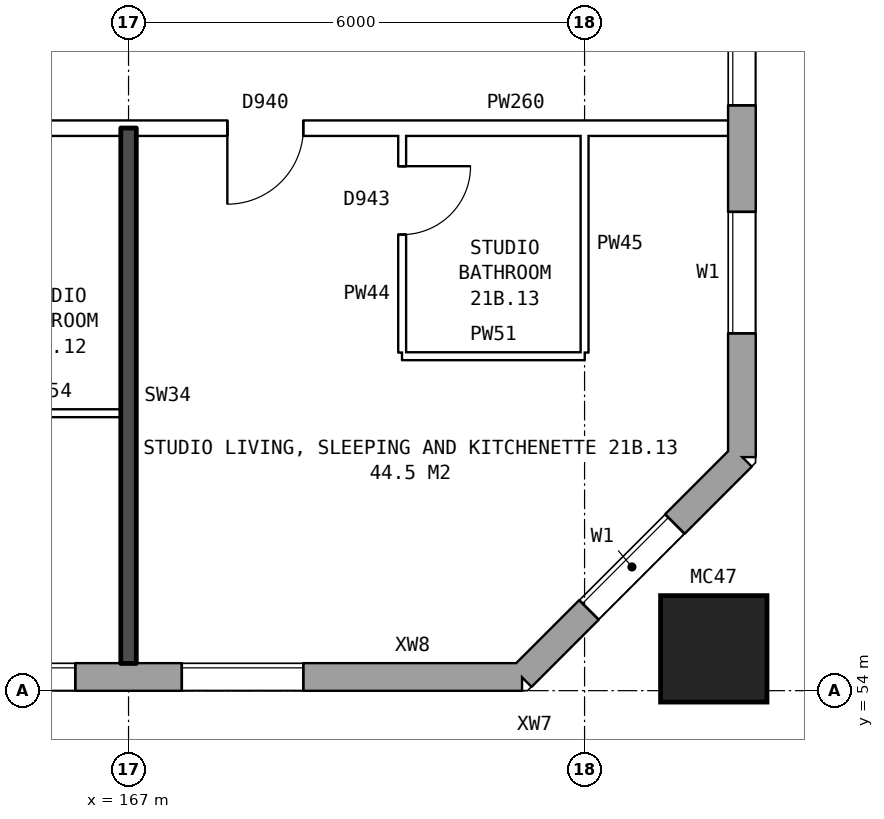
"""IFC4 building model, lengths in metres.
Left out: names, types, materials, properties, quantities, classifications, styles, units other than length and angle.
Written with IfcOpenShell. Run it as: python <this file> out.ifc"""

import sys

from ifc_helpers import new_model, si_unit, direction, frame, frame_2d, origin, origin_2d, place, context, subcontext, project, spatial, rectangle, hollow_rectangle, extrude, element, fill, save


model = new_model("IFC4")
c1 = context("Model", 3, precision=1e-05, world=origin(), true_north=direction((0.0, 1.0)))
c2 = subcontext(c1, "Body", "Model", "MODEL_VIEW")
j1 = project(units=[si_unit("LENGTHUNIT", "METRE"), si_unit("PLANEANGLEUNIT", "RADIAN")], contexts=[c1])
p1 = place(None, origin())
s1 = spatial("IfcSite", under=j1, at=p1, CompositionType="ELEMENT")
p2 = place(p1, origin())
s2 = spatial("IfcBuilding", under=s1, at=p2, CompositionType="ELEMENT")
p3 = place(p2, frame((0.0, 0.0, 77.8)))
s3 = spatial("IfcBuildingStorey", under=s2, at=p3, CompositionType="ELEMENT", Elevation=77.8)
p4 = place(p3, frame((174.7, 54.55, 0.0), z_axis=(0.0, 0.0, 1.0), x_axis=(1.0, 0.0, 0.0)))
e1 = element("IfcColumn", 1, at=p4, inside=s3, PredefinedType="COLUMN", context=c2, shape_type="SweptSolid", body=[
    extrude(hollow_rectangle(XDim=1.4, YDim=1.4, WallThickness=0.075, at=origin_2d()), origin(), (0.0, 0.0, 1.0), 3.1),
])
p5 = place(p3, frame((134.075, 54.18, 0.0), z_axis=(0.0, 0.0, 1.0), x_axis=(1.0, 0.0, 0.0)))
e2 = element("IfcWall", 2, at=p5, inside=s3, PredefinedType="STANDARD", context=c2, shape_type="SweptSolid", body=[
    extrude(rectangle(XDim=38.101, YDim=0.36, at=frame_2d((19.05, 0.0))), origin(), (0.0, 0.0, 1.0), 2.85),
])
p6 = place(p5, frame((0.625, 0.0, 0.8)))
e3 = element("IfcOpeningElement", 3, at=p6, cuts=e2, PredefinedType="OPENING", context=c2, shape_type="SweptSolid", body=[
    extrude(rectangle(XDim=1.6, YDim=1.8, at=frame_2d((0.8, 0.9))), frame((0.0, 0.19, 0.0), z_axis=(0.0, -1.0, 0.0), x_axis=(1.0, 0.0, 0.0)), (0.0, 0.0, 1.0), 0.38),
])
p7 = place(p5, frame((3.625, 0.0, 0.8)))
e4 = element("IfcOpeningElement", 4, at=p7, cuts=e2, PredefinedType="OPENING", context=c2, shape_type="SweptSolid", body=[
    extrude(rectangle(XDim=1.6, YDim=1.8, at=frame_2d((0.8, 0.9))), frame((0.0, 0.19, 0.0), z_axis=(0.0, -1.0, 0.0), x_axis=(1.0, 0.0, 0.0)), (0.0, 0.0, 1.0), 0.38),
])
p8 = place(p5, frame((5.525, 0.0, 0.8)))
e5 = element("IfcOpeningElement", 5, at=p8, cuts=e2, PredefinedType="OPENING", context=c2, shape_type="SweptSolid", body=[
    extrude(rectangle(XDim=1.6, YDim=1.8, at=frame_2d((0.8, 0.9))), frame((0.0, 0.19, 0.0), z_axis=(0.0, -1.0, 0.0), x_axis=(1.0, 0.0, 0.0)), (0.0, 0.0, 1.0), 0.38),
])
p9 = place(p5, frame((9.425, 0.0, 0.65)))
e6 = element("IfcOpeningElement", 6, at=p9, cuts=e2, PredefinedType="OPENING", context=c2, shape_type="SweptSolid", body=[
    extrude(rectangle(XDim=0.6, YDim=0.9, at=frame_2d((0.3, 0.45))), frame((0.0, 0.19, 0.0), z_axis=(0.0, -1.0, 0.0), x_axis=(1.0, 0.0, 0.0)), (0.0, 0.0, 1.0), 0.38),
])
p10 = place(p5, frame((12.625, 0.0, 0.8)))
e7 = element("IfcOpeningElement", 7, at=p10, cuts=e2, PredefinedType="OPENING", context=c2, shape_type="SweptSolid", body=[
    extrude(rectangle(XDim=1.6, YDim=1.8, at=frame_2d((0.8, 0.9))), frame((0.0, 0.19, 0.0), z_axis=(0.0, -1.0, 0.0), x_axis=(1.0, 0.0, 0.0)), (0.0, 0.0, 1.0), 0.38),
])
p11 = place(p5, frame((15.625, 0.0, 0.8)))
e8 = element("IfcOpeningElement", 8, at=p11, cuts=e2, PredefinedType="OPENING", context=c2, shape_type="SweptSolid", body=[
    extrude(rectangle(XDim=1.6, YDim=1.8, at=frame_2d((0.8, 0.9))), frame((0.0, 0.19, 0.0), z_axis=(0.0, -1.0, 0.0), x_axis=(1.0, 0.0, 0.0)), (0.0, 0.0, 1.0), 0.38),
])
p12 = place(p5, frame((18.625, 0.0, 0.8)))
e9 = element("IfcOpeningElement", 9, at=p12, cuts=e2, PredefinedType="OPENING", context=c2, shape_type="SweptSolid", body=[
    extrude(rectangle(XDim=1.6, YDim=1.8, at=frame_2d((0.8, 0.9))), frame((0.0, 0.19, 0.0), z_axis=(0.0, -1.0, 0.0), x_axis=(1.0, 0.0, 0.0)), (0.0, 0.0, 1.0), 0.38),
])
p13 = place(p5, frame((21.625, 0.0, 0.8)))
e10 = element("IfcOpeningElement", 10, at=p13, cuts=e2, PredefinedType="OPENING", context=c2, shape_type="SweptSolid", body=[
    extrude(rectangle(XDim=1.6, YDim=1.8, at=frame_2d((0.8, 0.9))), frame((0.0, 0.19, 0.0), z_axis=(0.0, -1.0, 0.0), x_axis=(1.0, 0.0, 0.0)), (0.0, 0.0, 1.0), 0.38),
])
p14 = place(p5, frame((24.625, 0.0, 0.8)))
e11 = element("IfcOpeningElement", 11, at=p14, cuts=e2, PredefinedType="OPENING", context=c2, shape_type="SweptSolid", body=[
    extrude(rectangle(XDim=1.6, YDim=1.8, at=frame_2d((0.8, 0.9))), frame((0.0, 0.19, 0.0), z_axis=(0.0, -1.0, 0.0), x_axis=(1.0, 0.0, 0.0)), (0.0, 0.0, 1.0), 0.38),
])
p15 = place(p5, frame((27.125, 0.0, 0.8)))
e12 = element("IfcOpeningElement", 12, at=p15, cuts=e2, PredefinedType="OPENING", context=c2, shape_type="SweptSolid", body=[
    extrude(rectangle(XDim=1.4, YDim=0.9, at=frame_2d((0.7, 0.45))), frame((0.0, 0.19, 0.0), z_axis=(0.0, -1.0, 0.0), x_axis=(1.0, 0.0, 0.0)), (0.0, 0.0, 1.0), 0.38),
])
p16 = place(p5, frame((30.625, 0.0, 0.8)))
e13 = element("IfcOpeningElement", 13, at=p16, cuts=e2, PredefinedType="OPENING", context=c2, shape_type="SweptSolid", body=[
    extrude(rectangle(XDim=1.6, YDim=1.8, at=frame_2d((0.8, 0.9))), frame((0.0, 0.19, 0.0), z_axis=(0.0, -1.0, 0.0), x_axis=(1.0, 0.0, 0.0)), (0.0, 0.0, 1.0), 0.38),
])
p17 = place(p5, frame((33.625, 0.0, 0.8)))
e14 = element("IfcOpeningElement", 14, at=p17, cuts=e2, PredefinedType="OPENING", context=c2, shape_type="SweptSolid", body=[
    extrude(rectangle(XDim=1.6, YDim=1.8, at=frame_2d((0.8, 0.9))), frame((0.0, 0.19, 0.0), z_axis=(0.0, -1.0, 0.0), x_axis=(1.0, 0.0, 0.0)), (0.0, 0.0, 1.0), 0.38),
])
p18 = place(p5, frame((7.425, 0.0, 1.3)))
e15 = element("IfcOpeningElement", 15, at=p18, cuts=e2, PredefinedType="OPENING", context=c2, shape_type="SweptSolid", body=[
    extrude(rectangle(XDim=0.6, YDim=1.2, at=frame_2d((0.3, 0.6))), frame((0.0, 0.19, 0.0), z_axis=(0.0, -1.0, 0.0), x_axis=(1.0, 0.0, 0.0)), (0.0, 0.0, 1.0), 0.38),
])
p19 = place(p5, frame((10.325, 0.0, 0.65)))
e16 = element("IfcOpeningElement", 16, at=p19, cuts=e2, PredefinedType="OPENING", context=c2, shape_type="SweptSolid", body=[
    extrude(rectangle(XDim=1.4, YDim=1.8, at=frame_2d((0.7, 0.9))), frame((0.0, 0.19, 0.0), z_axis=(0.0, -1.0, 0.0), x_axis=(1.0, 0.0, 0.0)), (0.0, 0.0, 1.0), 0.38),
])
p20 = place(p5, frame((29.675, 0.0, 1.7)))
e17 = element("IfcOpeningElement", 17, at=p20, cuts=e2, PredefinedType="OPENING", context=c2, shape_type="SweptSolid", body=[
    extrude(rectangle(XDim=0.6, YDim=0.9, at=frame_2d((0.3, 0.45))), frame((0.0, 0.19, 0.0), z_axis=(0.0, -1.0, 0.0), x_axis=(1.0, 0.0, 0.0)), (0.0, 0.0, 1.0), 0.38),
])
p21 = place(p3, frame((172.175, 54.18, 0.0), z_axis=(0.0, 0.0, 1.0), x_axis=(0.707106781187, 0.707106781187, 0.0)))
e18 = element("IfcWall", 18, at=p21, inside=s3, PredefinedType="STANDARD", context=c2, shape_type="SweptSolid", body=[
    extrude(rectangle(XDim=4.094, YDim=0.36, at=frame_2d((2.047, 0.0))), origin(), (0.0, 0.0, 1.0), 2.85),
])
p22 = place(p21, frame((1.247, 0.0, 0.8)))
e19 = element("IfcOpeningElement", 19, at=p22, cuts=e18, PredefinedType="OPENING", context=c2, shape_type="SweptSolid", body=[
    extrude(rectangle(XDim=1.6, YDim=1.8, at=frame_2d((0.8, 0.9))), frame((0.0, 0.19, 0.0), z_axis=(0.0, -1.0, 0.0), x_axis=(1.0, 0.0, 0.0)), (0.0, 0.0, 1.0), 0.38),
])
p23 = place(p3, frame((175.07, 57.075, 0.0), z_axis=(0.0, 0.0, 1.0), x_axis=(0.0, 1.0, 0.0)))
e20 = element("IfcWall", 20, at=p23, inside=s3, PredefinedType="STANDARD", context=c2, shape_type="SweptSolid", body=[
    extrude(rectangle(XDim=25.851, YDim=0.36, at=frame_2d((12.925, 0.0))), origin(), (0.0, 0.0, 1.0), 2.85),
])
p24 = place(p23, frame((1.625, 0.0, 0.8)))
e21 = element("IfcOpeningElement", 21, at=p24, cuts=e20, PredefinedType="OPENING", context=c2, shape_type="SweptSolid", body=[
    extrude(rectangle(XDim=1.6, YDim=1.8, at=frame_2d((0.8, 0.9))), frame((0.0, 0.19, 0.0), z_axis=(0.0, -1.0, 0.0), x_axis=(1.0, 0.0, 0.0)), (0.0, 0.0, 1.0), 0.38),
])
p25 = place(p23, frame((4.625, 0.0, 0.8)))
e22 = element("IfcOpeningElement", 22, at=p25, cuts=e20, PredefinedType="OPENING", context=c2, shape_type="SweptSolid", body=[
    extrude(rectangle(XDim=1.6, YDim=1.8, at=frame_2d((0.8, 0.9))), frame((0.0, 0.19, 0.0), z_axis=(0.0, -1.0, 0.0), x_axis=(1.0, 0.0, 0.0)), (0.0, 0.0, 1.0), 0.38),
])
p26 = place(p23, frame((7.625, 0.0, 0.8)))
e23 = element("IfcOpeningElement", 23, at=p26, cuts=e20, PredefinedType="OPENING", context=c2, shape_type="SweptSolid", body=[
    extrude(rectangle(XDim=1.6, YDim=1.8, at=frame_2d((0.8, 0.9))), frame((0.0, 0.19, 0.0), z_axis=(0.0, -1.0, 0.0), x_axis=(1.0, 0.0, 0.0)), (0.0, 0.0, 1.0), 0.38),
])
p27 = place(p23, frame((6.525, 0.0, 0.8)))
e24 = element("IfcOpeningElement", 24, at=p27, cuts=e20, PredefinedType="OPENING", context=c2, shape_type="SweptSolid", body=[
    extrude(rectangle(XDim=0.8, YDim=1.8, at=frame_2d((0.4, 0.9))), frame((0.0, 0.19, 0.0), z_axis=(0.0, -1.0, 0.0), x_axis=(1.0, 0.0, 0.0)), (0.0, 0.0, 1.0), 0.38),
])
p28 = place(p23, frame((9.525, 0.0, 0.8)))
e25 = element("IfcOpeningElement", 25, at=p28, cuts=e20, PredefinedType="OPENING", context=c2, shape_type="SweptSolid", body=[
    extrude(rectangle(XDim=1.4, YDim=1.2, at=frame_2d((0.7, 0.6))), frame((0.0, 0.19, 0.0), z_axis=(0.0, -1.0, 0.0), x_axis=(1.0, 0.0, 0.0)), (0.0, 0.0, 1.0), 0.38),
])
p29 = place(p23, frame((16.625, 0.0, 0.8)))
e26 = element("IfcOpeningElement", 26, at=p29, cuts=e20, PredefinedType="OPENING", context=c2, shape_type="SweptSolid", body=[
    extrude(rectangle(XDim=1.6, YDim=1.8, at=frame_2d((0.8, 0.9))), frame((0.0, 0.19, 0.0), z_axis=(0.0, -1.0, 0.0), x_axis=(1.0, 0.0, 0.0)), (0.0, 0.0, 1.0), 0.38),
])
p30 = place(p23, frame((19.625, 0.0, 0.8)))
e27 = element("IfcOpeningElement", 27, at=p30, cuts=e20, PredefinedType="OPENING", context=c2, shape_type="SweptSolid", body=[
    extrude(rectangle(XDim=1.6, YDim=1.8, at=frame_2d((0.8, 0.9))), frame((0.0, 0.19, 0.0), z_axis=(0.0, -1.0, 0.0), x_axis=(1.0, 0.0, 0.0)), (0.0, 0.0, 1.0), 0.38),
])
p31 = place(p23, frame((22.625, 0.0, 0.8)))
e28 = element("IfcOpeningElement", 28, at=p31, cuts=e20, PredefinedType="OPENING", context=c2, shape_type="SweptSolid", body=[
    extrude(rectangle(XDim=1.6, YDim=1.8, at=frame_2d((0.8, 0.9))), frame((0.0, 0.19, 0.0), z_axis=(0.0, -1.0, 0.0), x_axis=(1.0, 0.0, 0.0)), (0.0, 0.0, 1.0), 0.38),
])
p32 = place(p23, frame((12.275, 0.0, 0.8)))
e29 = element("IfcOpeningElement", 29, at=p32, cuts=e20, PredefinedType="OPENING", context=c2, shape_type="SweptSolid", body=[
    extrude(rectangle(XDim=1.2, YDim=1.8, at=frame_2d((0.6, 0.9))), frame((0.0, 0.19, 0.0), z_axis=(0.0, -1.0, 0.0), x_axis=(1.0, 0.0, 0.0)), (0.0, 0.0, 1.0), 0.38),
])
p33 = place(p23, frame((14.475, 0.0, 0.8)))
e30 = element("IfcOpeningElement", 30, at=p33, cuts=e20, PredefinedType="OPENING", context=c2, shape_type="SweptSolid", body=[
    extrude(rectangle(XDim=1.2, YDim=0.9, at=frame_2d((0.6, 0.45))), frame((0.0, 0.19, 0.0), z_axis=(0.0, -1.0, 0.0), x_axis=(1.0, 0.0, 0.0)), (0.0, 0.0, 1.0), 0.38),
])
p34 = place(p23, frame((18.525, 0.0, 0.8)))
e31 = element("IfcOpeningElement", 31, at=p34, cuts=e20, PredefinedType="OPENING", context=c2, shape_type="SweptSolid", body=[
    extrude(rectangle(XDim=0.6, YDim=1.8, at=frame_2d((0.3, 0.9))), frame((0.0, 0.19, 0.0), z_axis=(0.0, -1.0, 0.0), x_axis=(1.0, 0.0, 0.0)), (0.0, 0.0, 1.0), 0.38),
])
p35 = place(p3, frame((165.0, 57.65, 0.0), z_axis=(0.0, 0.0, 1.0), x_axis=(1.0, 0.0, 0.0)))
e32 = element("IfcWall", 32, at=p35, inside=s3, PredefinedType="PARTITIONING", context=c2, shape_type="SweptSolid", body=[
    extrude(rectangle(XDim=1.9, YDim=0.1, at=frame_2d((0.95, 0.0))), origin(), (0.0, 0.0, 1.0), 2.85),
])
p36 = place(p3, frame((170.6, 58.4, 0.0), z_axis=(0.0, 0.0, 1.0), x_axis=(1.0, 0.0, 0.0)))
e33 = element("IfcWall", 33, at=p36, inside=s3, PredefinedType="PARTITIONING", context=c2, shape_type="SweptSolid", body=[
    extrude(rectangle(XDim=2.4, YDim=0.1, at=frame_2d((1.2, 0.0))), origin(), (0.0, 0.0, 1.0), 2.85),
])
p37 = place(p3, frame((155.1, 61.4, 0.0), z_axis=(0.0, 0.0, 1.0), x_axis=(1.0, 0.0, 0.0)))
e34 = element("IfcWall", 34, at=p37, inside=s3, PredefinedType="PARTITIONING", context=c2, shape_type="SweptSolid", body=[
    extrude(rectangle(XDim=19.79, YDim=0.2, at=frame_2d((9.895, 0.0))), origin(), (0.0, 0.0, 1.0), 2.85),
])
p38 = place(p37, frame((1.45, 0.0, 0.0)))
e35 = element("IfcOpeningElement", 35, at=p38, cuts=e34, PredefinedType="OPENING", context=c2, shape_type="SweptSolid", body=[
    extrude(rectangle(XDim=1.0, YDim=2.1, at=frame_2d((0.5, 1.05))), frame((0.0, 0.11, 0.0), z_axis=(0.0, -1.0, 0.0), x_axis=(1.0, 0.0, 0.0)), (0.0, 0.0, 1.0), 0.22),
])
p39 = place(p37, frame((7.4, 0.0, 0.0)))
e36 = element("IfcOpeningElement", 36, at=p39, cuts=e34, PredefinedType="OPENING", context=c2, shape_type="SweptSolid", body=[
    extrude(rectangle(XDim=1.0, YDim=2.1, at=frame_2d((0.5, 1.05))), frame((0.0, 0.11, 0.0), z_axis=(0.0, -1.0, 0.0), x_axis=(1.0, 0.0, 0.0)), (0.0, 0.0, 1.0), 0.22),
])
p40 = place(p37, frame((13.2, 0.0, 0.0)))
e37 = element("IfcOpeningElement", 37, at=p40, cuts=e34, PredefinedType="OPENING", context=c2, shape_type="SweptSolid", body=[
    extrude(rectangle(XDim=1.0, YDim=2.1, at=frame_2d((0.5, 1.05))), frame((0.0, 0.11, 0.0), z_axis=(0.0, -1.0, 0.0), x_axis=(1.0, 0.0, 0.0)), (0.0, 0.0, 1.0), 0.22),
])
p41 = place(p3, frame((167.0, 54.36, 0.0), z_axis=(0.0, 0.0, 1.0), x_axis=(0.0, 1.0, 0.0)))
e38 = element("IfcWall", 38, at=p41, inside=s3, PredefinedType="SOLIDWALL", context=c2, shape_type="SweptSolid", body=[
    extrude(rectangle(XDim=7.04, YDim=0.2, at=frame_2d((3.52, 0.0))), origin(), (0.0, 0.0, 1.0), 2.85),
])
p42 = place(p3, frame((170.6, 58.45, 0.0), z_axis=(0.0, 0.0, 1.0), x_axis=(0.0, 1.0, 0.0)))
e39 = element("IfcWall", 39, at=p42, inside=s3, PredefinedType="PARTITIONING", context=c2, shape_type="SweptSolid", body=[
    extrude(rectangle(XDim=2.85, YDim=0.1, at=frame_2d((1.425, 0.0))), origin(), (0.0, 0.0, 1.0), 2.85),
])
p43 = place(p42, frame((1.55, 0.0, 0.0)))
e40 = element("IfcOpeningElement", 40, at=p43, cuts=e39, PredefinedType="OPENING", context=c2, shape_type="SweptSolid", body=[
    extrude(rectangle(XDim=0.9, YDim=2.1, at=frame_2d((0.45, 1.05))), frame((0.0, 0.06, 0.0), z_axis=(0.0, -1.0, 0.0), x_axis=(1.0, 0.0, 0.0)), (0.0, 0.0, 1.0), 0.12),
])
p44 = place(p3, frame((173.0, 58.45, 0.0), z_axis=(0.0, 0.0, 1.0), x_axis=(0.0, 1.0, 0.0)))
e41 = element("IfcWall", 41, at=p44, inside=s3, PredefinedType="PARTITIONING", context=c2, shape_type="SweptSolid", body=[
    extrude(rectangle(XDim=2.85, YDim=0.1, at=frame_2d((1.425, 0.0))), origin(), (0.0, 0.0, 1.0), 2.85),
])
p45 = place(p16, origin())
e42 = element("IfcWindow", 42, at=p45, inside=s3, PartitioningType="SINGLE_PANEL", PredefinedType="WINDOW", context=c2, shape_type="SweptSolid", body=[
    extrude(rectangle(XDim=1.6, YDim=1.8, at=frame_2d((0.8, 0.9))), frame((0.0, 0.15, 0.0), z_axis=(0.0, -1.0, 0.0), x_axis=(1.0, 0.0, 0.0)), (0.0, 0.0, 1.0), 0.06),
])
fill(e13, e42)
p46 = place(p17, origin())
e43 = element("IfcWindow", 43, at=p46, inside=s3, PartitioningType="SINGLE_PANEL", PredefinedType="WINDOW", context=c2, shape_type="SweptSolid", body=[
    extrude(rectangle(XDim=1.6, YDim=1.8, at=frame_2d((0.8, 0.9))), frame((0.0, 0.15, 0.0), z_axis=(0.0, -1.0, 0.0), x_axis=(1.0, 0.0, 0.0)), (0.0, 0.0, 1.0), 0.06),
])
fill(e14, e43)
p47 = place(p22, origin())
e44 = element("IfcWindow", 44, at=p47, inside=s3, PartitioningType="SINGLE_PANEL", PredefinedType="WINDOW", context=c2, shape_type="SweptSolid", body=[
    extrude(rectangle(XDim=1.6, YDim=1.8, at=frame_2d((0.8, 0.9))), frame((0.0, 0.15, 0.0), z_axis=(0.0, -1.0, 0.0), x_axis=(1.0, 0.0, 0.0)), (0.0, 0.0, 1.0), 0.06),
])
fill(e19, e44)
p48 = place(p24, origin())
e45 = element("IfcWindow", 45, at=p48, inside=s3, PartitioningType="SINGLE_PANEL", PredefinedType="WINDOW", context=c2, shape_type="SweptSolid", body=[
    extrude(rectangle(XDim=1.6, YDim=1.8, at=frame_2d((0.8, 0.9))), frame((0.0, 0.15, 0.0), z_axis=(0.0, -1.0, 0.0), x_axis=(1.0, 0.0, 0.0)), (0.0, 0.0, 1.0), 0.06),
])
fill(e21, e45)
p49 = place(p25, origin())
e46 = element("IfcWindow", 46, at=p49, inside=s3, PartitioningType="SINGLE_PANEL", PredefinedType="WINDOW", context=c2, shape_type="SweptSolid", body=[
    extrude(rectangle(XDim=1.6, YDim=1.8, at=frame_2d((0.8, 0.9))), frame((0.0, 0.15, 0.0), z_axis=(0.0, -1.0, 0.0), x_axis=(1.0, 0.0, 0.0)), (0.0, 0.0, 1.0), 0.06),
])
fill(e22, e46)
p50 = place(p40, frame((1.0, 0.0, 0.0), z_axis=(0.0, 0.0, 1.0), x_axis=(-1.0, 0.0, 0.0)))
e47 = element("IfcDoor", 47, at=p50, inside=s3, OperationType="SINGLE_SWING_RIGHT", PredefinedType="DOOR", context=c2, shape_type="SweptSolid", body=[
    extrude(rectangle(XDim=1.0, YDim=2.1, at=frame_2d((0.5, 1.05))), frame((0.0, 0.025, 0.0), z_axis=(0.0, -1.0, 0.0), x_axis=(1.0, 0.0, 0.0)), (0.0, 0.0, 1.0), 0.05),
])
fill(e37, e47)
p51 = place(p43, frame((0.9, 0.0, 0.0), z_axis=(0.0, 0.0, 1.0), x_axis=(-1.0, 0.0, 0.0)))
e48 = element("IfcDoor", 48, at=p51, inside=s3, OperationType="SINGLE_SWING_LEFT", PredefinedType="DOOR", context=c2, shape_type="SweptSolid", body=[
    extrude(rectangle(XDim=0.9, YDim=2.1, at=frame_2d((0.45, 1.05))), frame((0.0, 0.025, 0.0), z_axis=(0.0, -1.0, 0.0), x_axis=(1.0, 0.0, 0.0)), (0.0, 0.0, 1.0), 0.05),
])
fill(e40, e48)
save(model, sys.argv[1])
